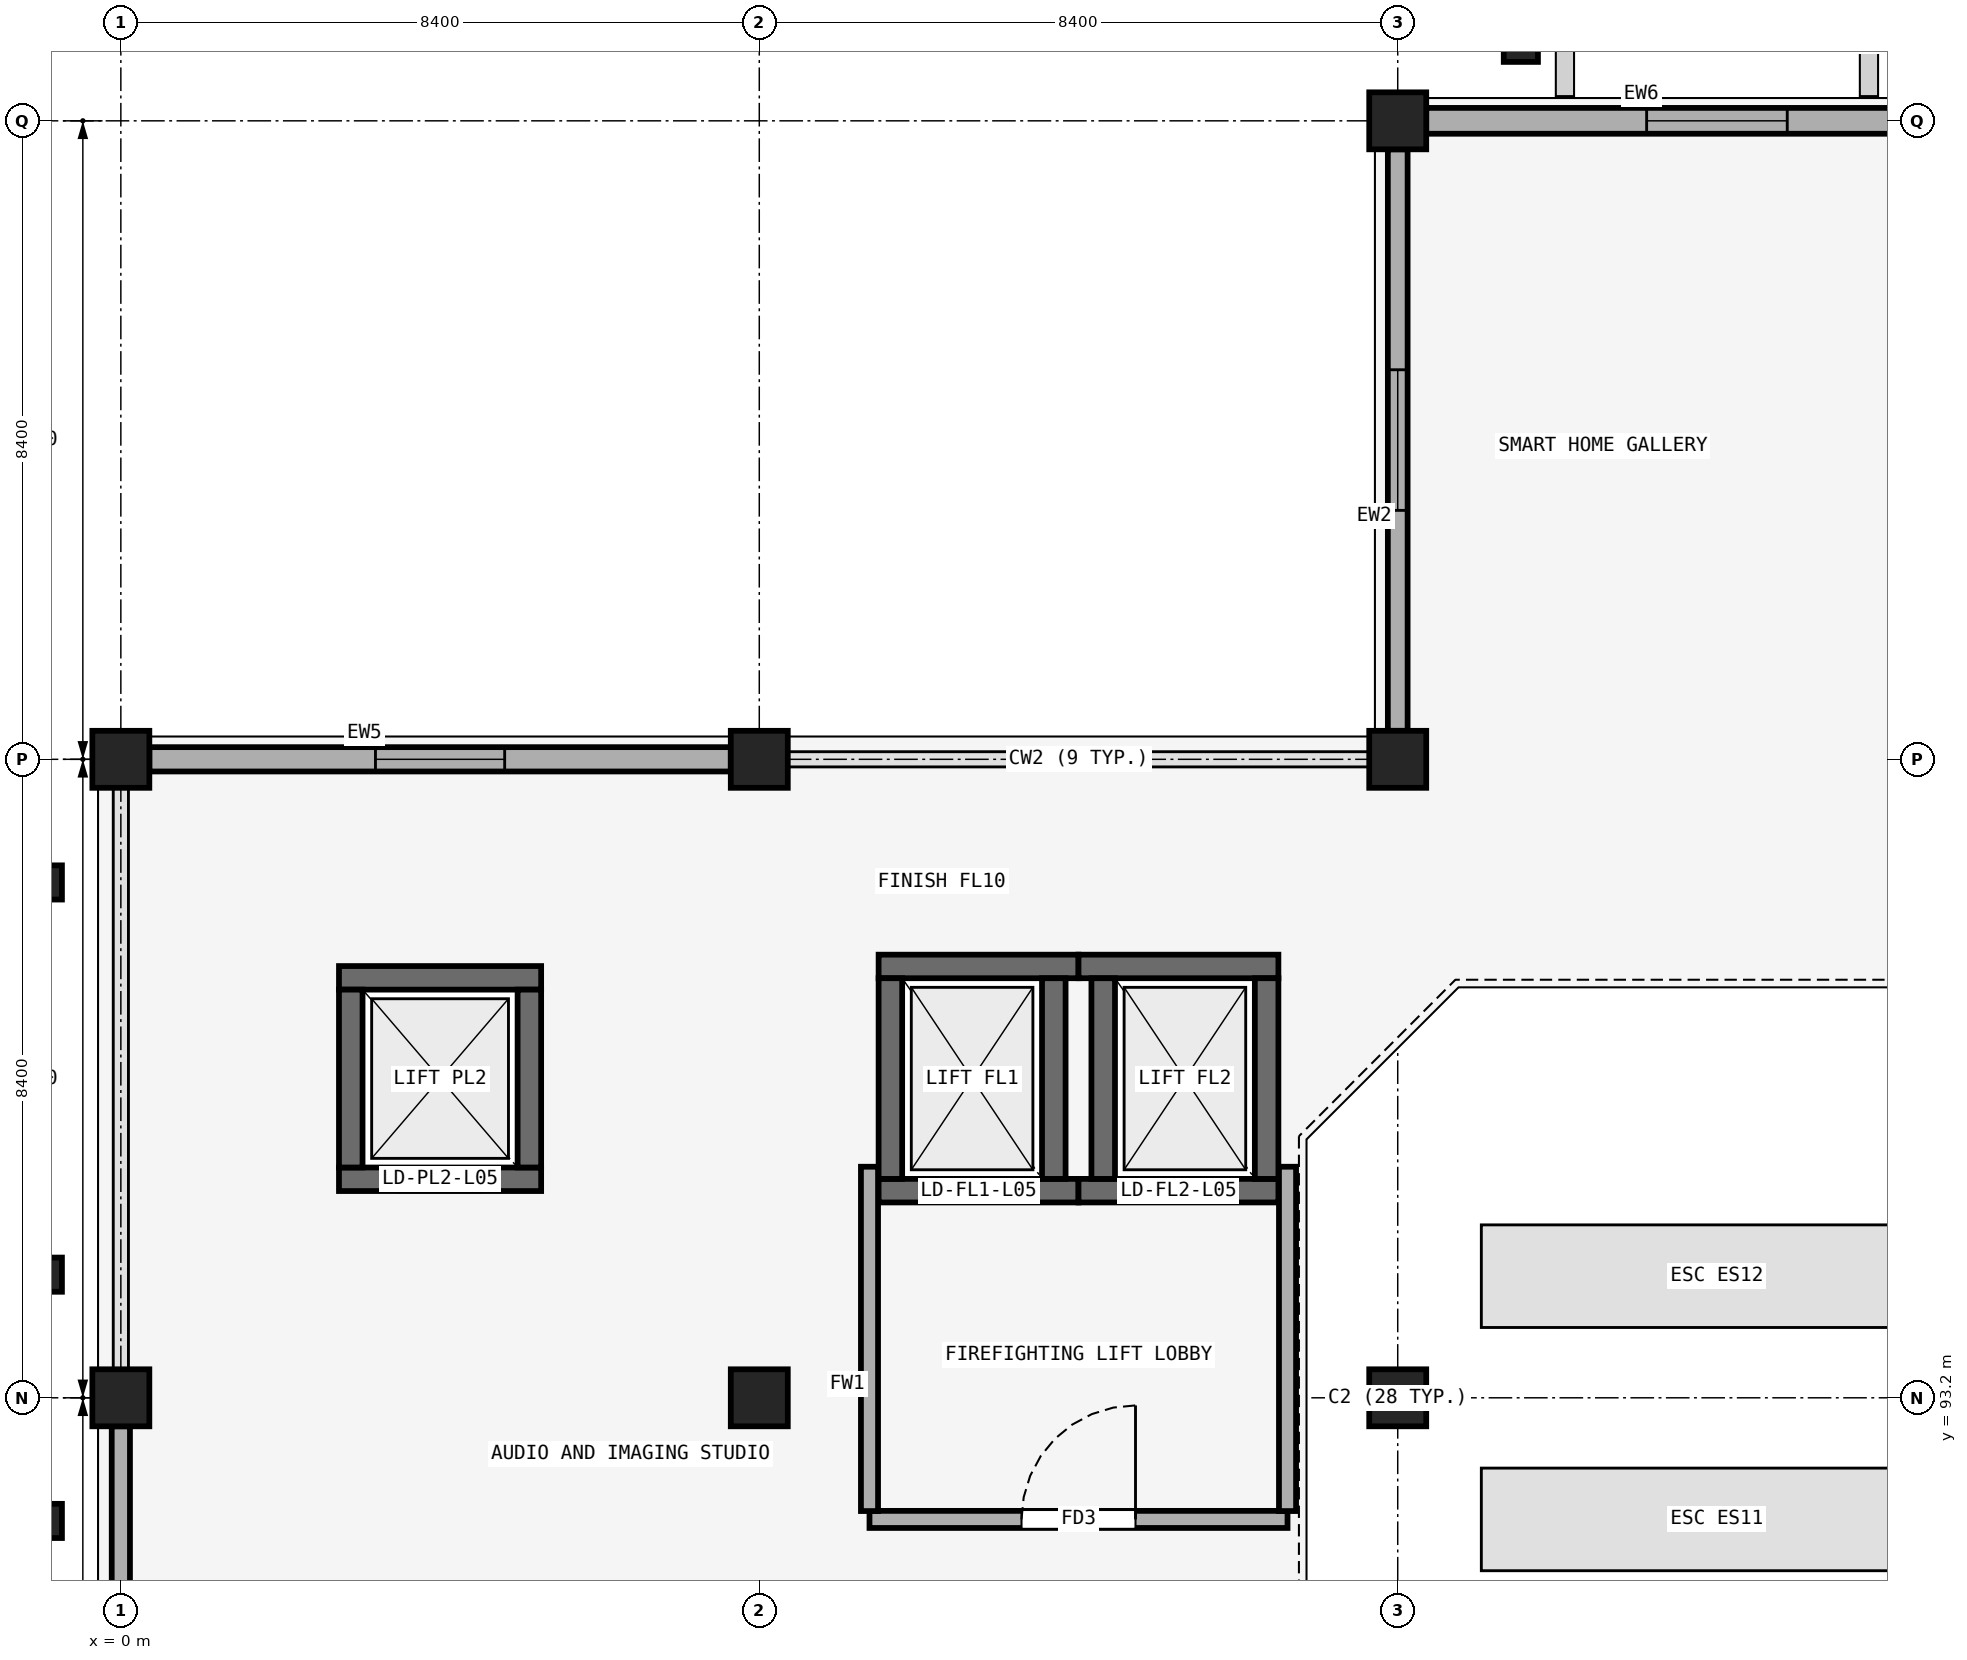
"""IFC4 building model, lengths in metres.
Left out: names, types, materials, properties, quantities, classifications, styles, units other than length and angle.
Written with IfcOpenShell. Run it as: python <this file> out.ifc"""

import sys

from ifc_helpers import new_model, si_unit, direction, frame, frame_2d, origin, origin_2d, place, context, subcontext, project, spatial, rectangle, extrude, element, fill, save


model = new_model("IFC4")
c1 = context("Model", 3, precision=1e-05, world=origin(), true_north=direction((0.0, 1.0)))
c2 = subcontext(c1, "Body", "Model", "MODEL_VIEW")
j1 = project(units=[si_unit("LENGTHUNIT", "METRE"), si_unit("PLANEANGLEUNIT", "RADIAN")], contexts=[c1])
p1 = place(None, origin())
s1 = spatial("IfcSite", under=j1, at=p1, CompositionType="ELEMENT")
p2 = place(p1, origin())
s2 = spatial("IfcBuilding", under=s1, at=p2, CompositionType="ELEMENT")
p3 = place(p2, frame((0.0, 0.0, 23.4)))
s3 = spatial("IfcBuildingStorey", under=s2, at=p3, CompositionType="ELEMENT", Elevation=23.4)
for number, where, z_axis, x_axis in (
    (1, (0.0, 93.2, 0.0), (0.0, 0.0, 1.0), (1.0, 0.0, 0.0)),
    (2, (8.4, 93.2, 0.0), (0.0, 0.0, 1.0), (1.0, 0.0, 0.0)),
    (3, (16.8, 93.2, 0.0), (0.0, 0.0, 1.0), (1.0, 0.0, 0.0)),
    (4, (0.0, 101.6, 0.0), (0.0, 0.0, 1.0), (1.0, 0.0, 0.0)),
    (5, (8.4, 101.6, 0.0), (0.0, 0.0, 1.0), (1.0, 0.0, 0.0)),
    (6, (16.8, 101.6, 0.0), (0.0, 0.0, 1.0), (1.0, 0.0, 0.0)),
    (7, (16.8, 110.0, 0.0), (0.0, 0.0, 1.0), (1.0, 0.0, 0.0)),
):
    element("IfcColumn", number, at=place(p3, frame(where, z_axis=z_axis, x_axis=x_axis)), inside=s3, PredefinedType="COLUMN", context=c2, shape_type="SweptSolid", body=[
        extrude(rectangle(XDim=0.75, YDim=0.75, at=origin_2d()), origin(), (0.0, 0.0, 1.0), 4.5),
    ])
for number, where, z_axis, x_axis in (
    (8, (18.42, 111.05, 0.0), (0.0, 0.0, 1.0), (1.0, 0.0, 0.0)),
    (9, (-1.05, 91.58, 0.0), (0.0, 0.0, 1.0), (0.0, 1.0, 0.0)),
    (10, (-1.05, 94.82, 0.0), (0.0, 0.0, 1.0), (0.0, 1.0, 0.0)),
    (11, (-1.05, 99.98, 0.0), (0.0, 0.0, 1.0), (0.0, 1.0, 0.0)),
):
    element("IfcColumn", number, at=place(p3, frame(where, z_axis=z_axis, x_axis=x_axis)), inside=s3, PredefinedType="PILASTER", context=c2, shape_type="SweptSolid", body=[
        extrude(rectangle(XDim=0.45, YDim=0.55, at=origin_2d()), origin(), (0.0, 0.0, 1.0), 4.5),
    ])
p4 = place(p3, frame((0.375, 101.6, 0.0), z_axis=(0.0, 0.0, 1.0), x_axis=(1.0, 0.0, 0.0)))
e12 = element("IfcWall", 12, at=p4, inside=s3, PredefinedType="SOLIDWALL", context=c2, shape_type="SweptSolid", body=[
    extrude(rectangle(XDim=7.65, YDim=0.32, at=frame_2d((3.825, 0.0))), origin(), (0.0, 0.0, 1.0), 3.45),
])
p5 = place(p4, frame((2.975, 0.0, 0.95)))
e13 = element("IfcOpeningElement", 13, at=p5, cuts=e12, PredefinedType="OPENING", context=c2, shape_type="SweptSolid", body=[
    extrude(rectangle(XDim=1.7, YDim=2.1, at=frame_2d((0.85, 1.05))), frame((0.0, 0.17, 0.0), z_axis=(0.0, -1.0, 0.0), x_axis=(1.0, 0.0, 0.0)), (0.0, 0.0, 1.0), 0.34),
])
p6 = place(p3, frame((17.175, 110.0, 0.0), z_axis=(0.0, 0.0, 1.0), x_axis=(1.0, 0.0, 0.0)))
e14 = element("IfcWall", 14, at=p6, inside=s3, PredefinedType="SOLIDWALL", context=c2, shape_type="SweptSolid", body=[
    extrude(rectangle(XDim=7.65, YDim=0.34, at=frame_2d((3.825, 0.0))), origin(), (0.0, 0.0, 1.0), 3.45),
])
p7 = place(p6, frame((2.9, 0.0, 0.95)))
e15 = element("IfcOpeningElement", 15, at=p7, cuts=e14, PredefinedType="OPENING", context=c2, shape_type="SweptSolid", body=[
    extrude(rectangle(XDim=1.85, YDim=1.35, at=frame_2d((0.925, 0.675))), frame((0.0, 0.18, 0.0), z_axis=(0.0, -1.0, 0.0), x_axis=(1.0, 0.0, 0.0)), (0.0, 0.0, 1.0), 0.36),
])
p8 = place(p3, frame((0.0, 85.175, 0.0), z_axis=(0.0, 0.0, 1.0), x_axis=(0.0, 1.0, 0.0)))
e16 = element("IfcWall", 16, at=p8, inside=s3, PredefinedType="SOLIDWALL", context=c2, shape_type="SweptSolid", body=[
    extrude(rectangle(XDim=7.65, YDim=0.24, at=frame_2d((3.825, 0.0))), origin(), (0.0, 0.0, 1.0), 3.45),
])
p9 = place(p8, frame((2.9, 0.0, 0.95)))
e17 = element("IfcOpeningElement", 17, at=p9, cuts=e16, PredefinedType="OPENING", context=c2, shape_type="SweptSolid", body=[
    extrude(rectangle(XDim=1.85, YDim=1.85, at=frame_2d((0.925, 0.925))), frame((0.0, 0.13, 0.0), z_axis=(0.0, -1.0, 0.0), x_axis=(1.0, 0.0, 0.0)), (0.0, 0.0, 1.0), 0.26),
])
p10 = place(p3, frame((16.8, 101.975, 0.0), z_axis=(0.0, 0.0, 1.0), x_axis=(0.0, 1.0, 0.0)))
e18 = element("IfcWall", 18, at=p10, inside=s3, PredefinedType="SOLIDWALL", context=c2, shape_type="SweptSolid", body=[
    extrude(rectangle(XDim=7.65, YDim=0.26, at=frame_2d((3.825, 0.0))), origin(), (0.0, 0.0, 1.0), 3.45),
])
p11 = place(p10, frame((2.9, 0.0, 0.95)))
e19 = element("IfcOpeningElement", 19, at=p11, cuts=e18, PredefinedType="OPENING", context=c2, shape_type="SweptSolid", body=[
    extrude(rectangle(XDim=1.85, YDim=2.1, at=frame_2d((0.925, 1.05))), frame((0.0, 0.14, 0.0), z_axis=(0.0, -1.0, 0.0), x_axis=(1.0, 0.0, 0.0)), (0.0, 0.0, 1.0), 0.28),
])
p12 = place(p3, frame((9.97, 95.925, 0.0), z_axis=(0.0, 0.0, 1.0), x_axis=(1.0, 0.0, 0.0)))
e20 = element("IfcWall", 20, at=p12, inside=s3, PredefinedType="SHEAR", context=c2, shape_type="SweptSolid", body=[
    extrude(rectangle(XDim=2.63, YDim=0.31, at=frame_2d((1.315, 0.0))), origin(), (0.0, 0.0, 1.0), 4.2),
])
p13 = place(p12, frame((0.715, 0.0, 0.0)))
e21 = element("IfcOpeningElement", 21, at=p13, cuts=e20, PredefinedType="OPENING", context=c2, shape_type="SweptSolid", body=[
    extrude(rectangle(XDim=1.2, YDim=2.25, at=frame_2d((0.6, 1.125))), frame((0.0, 0.165, 0.0), z_axis=(0.0, -1.0, 0.0), x_axis=(1.0, 0.0, 0.0)), (0.0, 0.0, 1.0), 0.33),
])
p14 = place(p3, frame((9.97, 98.875, 0.0), z_axis=(0.0, 0.0, 1.0), x_axis=(1.0, 0.0, 0.0)))
e22 = element("IfcWall", 22, at=p14, inside=s3, PredefinedType="SHEAR", context=c2, shape_type="SweptSolid", body=[
    extrude(rectangle(XDim=2.63, YDim=0.31, at=frame_2d((1.315, 0.0))), origin(), (0.0, 0.0, 1.0), 4.2),
])
for number, where, z_axis, x_axis in (
    (23, (10.125, 96.08, 0.0), (0.0, 0.0, 1.0), (0.0, 1.0, 0.0)),
    (24, (12.275, 96.08, 0.0), (0.0, 0.0, 1.0), (0.0, 1.0, 0.0)),
):
    element("IfcWall", number, at=place(p3, frame(where, z_axis=z_axis, x_axis=x_axis)), inside=s3, PredefinedType="SHEAR", context=c2, shape_type="SweptSolid", body=[
        extrude(rectangle(XDim=2.64, YDim=0.31, at=frame_2d((1.32, 0.0))), origin(), (0.0, 0.0, 1.0), 4.2),
    ])
p15 = place(p3, frame((12.6, 95.925, 0.0), z_axis=(0.0, 0.0, 1.0), x_axis=(1.0, 0.0, 0.0)))
e25 = element("IfcWall", 25, at=p15, inside=s3, PredefinedType="SHEAR", context=c2, shape_type="SweptSolid", body=[
    extrude(rectangle(XDim=2.63, YDim=0.31, at=frame_2d((1.315, 0.0))), origin(), (0.0, 0.0, 1.0), 4.2),
])
p16 = place(p15, frame((0.715, 0.0, 0.0)))
e26 = element("IfcOpeningElement", 26, at=p16, cuts=e25, PredefinedType="OPENING", context=c2, shape_type="SweptSolid", body=[
    extrude(rectangle(XDim=1.2, YDim=2.25, at=frame_2d((0.6, 1.125))), frame((0.0, 0.165, 0.0), z_axis=(0.0, -1.0, 0.0), x_axis=(1.0, 0.0, 0.0)), (0.0, 0.0, 1.0), 0.33),
])
p17 = place(p3, frame((12.6, 98.875, 0.0), z_axis=(0.0, 0.0, 1.0), x_axis=(1.0, 0.0, 0.0)))
e27 = element("IfcWall", 27, at=p17, inside=s3, PredefinedType="SHEAR", context=c2, shape_type="SweptSolid", body=[
    extrude(rectangle(XDim=2.63, YDim=0.31, at=frame_2d((1.315, 0.0))), origin(), (0.0, 0.0, 1.0), 4.2),
])
for number, where, z_axis, x_axis in (
    (28, (12.925, 96.08, 0.0), (0.0, 0.0, 1.0), (0.0, 1.0, 0.0)),
    (29, (15.075, 96.08, 0.0), (0.0, 0.0, 1.0), (0.0, 1.0, 0.0)),
):
    element("IfcWall", number, at=place(p3, frame(where, z_axis=z_axis, x_axis=x_axis)), inside=s3, PredefinedType="SHEAR", context=c2, shape_type="SweptSolid", body=[
        extrude(rectangle(XDim=2.64, YDim=0.31, at=frame_2d((1.32, 0.0))), origin(), (0.0, 0.0, 1.0), 4.2),
    ])
p18 = place(p3, frame((2.87, 96.075, 0.0), z_axis=(0.0, 0.0, 1.0), x_axis=(1.0, 0.0, 0.0)))
e30 = element("IfcWall", 30, at=p18, inside=s3, PredefinedType="SHEAR", context=c2, shape_type="SweptSolid", body=[
    extrude(rectangle(XDim=2.66, YDim=0.31, at=frame_2d((1.33, 0.0))), origin(), (0.0, 0.0, 1.0), 4.2),
])
p19 = place(p18, frame((0.78, 0.0, 0.0)))
e31 = element("IfcOpeningElement", 31, at=p19, cuts=e30, PredefinedType="OPENING", context=c2, shape_type="SweptSolid", body=[
    extrude(rectangle(XDim=1.1, YDim=2.2, at=frame_2d((0.55, 1.1))), frame((0.0, 0.165, 0.0), z_axis=(0.0, -1.0, 0.0), x_axis=(1.0, 0.0, 0.0)), (0.0, 0.0, 1.0), 0.33),
])
p20 = place(p3, frame((2.87, 98.725, 0.0), z_axis=(0.0, 0.0, 1.0), x_axis=(1.0, 0.0, 0.0)))
e32 = element("IfcWall", 32, at=p20, inside=s3, PredefinedType="SHEAR", context=c2, shape_type="SweptSolid", body=[
    extrude(rectangle(XDim=2.66, YDim=0.31, at=frame_2d((1.33, 0.0))), origin(), (0.0, 0.0, 1.0), 4.2),
])
for number, where, z_axis, x_axis in (
    (33, (3.025, 96.23, 0.0), (0.0, 0.0, 1.0), (0.0, 1.0, 0.0)),
    (34, (5.375, 96.23, 0.0), (0.0, 0.0, 1.0), (0.0, 1.0, 0.0)),
):
    element("IfcWall", number, at=place(p3, frame(where, z_axis=z_axis, x_axis=x_axis)), inside=s3, PredefinedType="SHEAR", context=c2, shape_type="SweptSolid", body=[
        extrude(rectangle(XDim=2.34, YDim=0.31, at=frame_2d((1.17, 0.0))), origin(), (0.0, 0.0, 1.0), 4.2),
    ])
p21 = place(p3, frame((9.85, 91.6, 0.0), z_axis=(0.0, 0.0, 1.0), x_axis=(1.0, 0.0, 0.0)))
e35 = element("IfcWall", 35, at=p21, inside=s3, PredefinedType="PARTITIONING", context=c2, shape_type="SweptSolid", body=[
    extrude(rectangle(XDim=5.5, YDim=0.225, at=frame_2d((2.75, 0.0))), origin(), (0.0, 0.0, 1.0), 4.2),
])
p22 = place(p21, frame((2.0, 0.0, 0.0)))
e36 = element("IfcOpeningElement", 36, at=p22, cuts=e35, PredefinedType="OPENING", context=c2, shape_type="SweptSolid", body=[
    extrude(rectangle(XDim=1.5, YDim=2.25, at=frame_2d((0.75, 1.125))), frame((0.0, 0.123, 0.0), z_axis=(0.0, -1.0, 0.0), x_axis=(1.0, 0.0, 0.0)), (0.0, 0.0, 1.0), 0.245),
])
for number, where, z_axis, x_axis in (
    (37, (9.85, 91.71, 0.0), (0.0, 0.0, 1.0), (0.0, 1.0, 0.0)),
    (38, (15.35, 91.71, 0.0), (0.0, 0.0, 1.0), (0.0, 1.0, 0.0)),
):
    element("IfcWall", number, at=place(p3, frame(where, z_axis=z_axis, x_axis=x_axis)), inside=s3, PredefinedType="PARTITIONING", context=c2, shape_type="SweptSolid", body=[
        extrude(rectangle(XDim=4.53, YDim=0.225, at=frame_2d((2.265, 0.0))), origin(), (0.0, 0.0, 1.0), 3.5),
    ])
p23 = place(p5, origin())
e39 = element("IfcWindow", 39, at=p23, inside=s3, PartitioningType="DOUBLE_PANEL_VERTICAL", PredefinedType="WINDOW", context=c2, shape_type="SweptSolid", body=[
    extrude(rectangle(XDim=1.7, YDim=2.1, at=frame_2d((0.85, 1.05))), frame((0.0, 0.03, 0.0), z_axis=(0.0, -1.0, 0.0), x_axis=(1.0, 0.0, 0.0)), (0.0, 0.0, 1.0), 0.06),
])
fill(e13, e39)
p24 = place(p7, origin())
e40 = element("IfcWindow", 40, at=p24, inside=s3, PartitioningType="DOUBLE_PANEL_VERTICAL", PredefinedType="WINDOW", context=c2, shape_type="SweptSolid", body=[
    extrude(rectangle(XDim=1.85, YDim=1.35, at=frame_2d((0.925, 0.675))), frame((0.0, 0.03, 0.0), z_axis=(0.0, -1.0, 0.0), x_axis=(1.0, 0.0, 0.0)), (0.0, 0.0, 1.0), 0.06),
])
fill(e15, e40)
p25 = place(p11, origin())
e41 = element("IfcWindow", 41, at=p25, inside=s3, PartitioningType="DOUBLE_PANEL_VERTICAL", PredefinedType="WINDOW", context=c2, shape_type="SweptSolid", body=[
    extrude(rectangle(XDim=1.85, YDim=2.1, at=frame_2d((0.925, 1.05))), frame((0.0, 0.03, 0.0), z_axis=(0.0, -1.0, 0.0), x_axis=(1.0, 0.0, 0.0)), (0.0, 0.0, 1.0), 0.06),
])
fill(e19, e41)
p26 = place(p13, origin())
e42 = element("IfcDoor", 42, at=p26, inside=s3, OperationType="SLIDING_TO_LEFT", PredefinedType="DOOR", context=c2, shape_type="SweptSolid", body=[
    extrude(rectangle(XDim=1.2, YDim=2.25, at=frame_2d((0.6, 1.125))), frame((0.0, 0.025, 0.0), z_axis=(0.0, -1.0, 0.0), x_axis=(1.0, 0.0, 0.0)), (0.0, 0.0, 1.0), 0.05),
])
fill(e21, e42)
p27 = place(p16, origin())
e43 = element("IfcDoor", 43, at=p27, inside=s3, OperationType="SLIDING_TO_LEFT", PredefinedType="DOOR", context=c2, shape_type="SweptSolid", body=[
    extrude(rectangle(XDim=1.2, YDim=2.25, at=frame_2d((0.6, 1.125))), frame((0.0, 0.025, 0.0), z_axis=(0.0, -1.0, 0.0), x_axis=(1.0, 0.0, 0.0)), (0.0, 0.0, 1.0), 0.05),
])
fill(e26, e43)
p28 = place(p19, origin())
e44 = element("IfcDoor", 44, at=p28, inside=s3, OperationType="SLIDING_TO_LEFT", PredefinedType="DOOR", context=c2, shape_type="SweptSolid", body=[
    extrude(rectangle(XDim=1.1, YDim=2.2, at=frame_2d((0.55, 1.1))), frame((0.0, 0.025, 0.0), z_axis=(0.0, -1.0, 0.0), x_axis=(1.0, 0.0, 0.0)), (0.0, 0.0, 1.0), 0.05),
])
fill(e31, e44)
p29 = place(p22, origin())
e45 = element("IfcDoor", 45, at=p29, inside=s3, OperationType="SINGLE_SWING_RIGHT", PredefinedType="DOOR", context=c2, shape_type="SweptSolid", body=[
    extrude(rectangle(XDim=1.5, YDim=2.25, at=frame_2d((0.75, 1.125))), frame((0.0, 0.025, 0.0), z_axis=(0.0, -1.0, 0.0), x_axis=(1.0, 0.0, 0.0)), (0.0, 0.0, 1.0), 0.05),
])
fill(e36, e45)
save(model, sys.argv[1])
